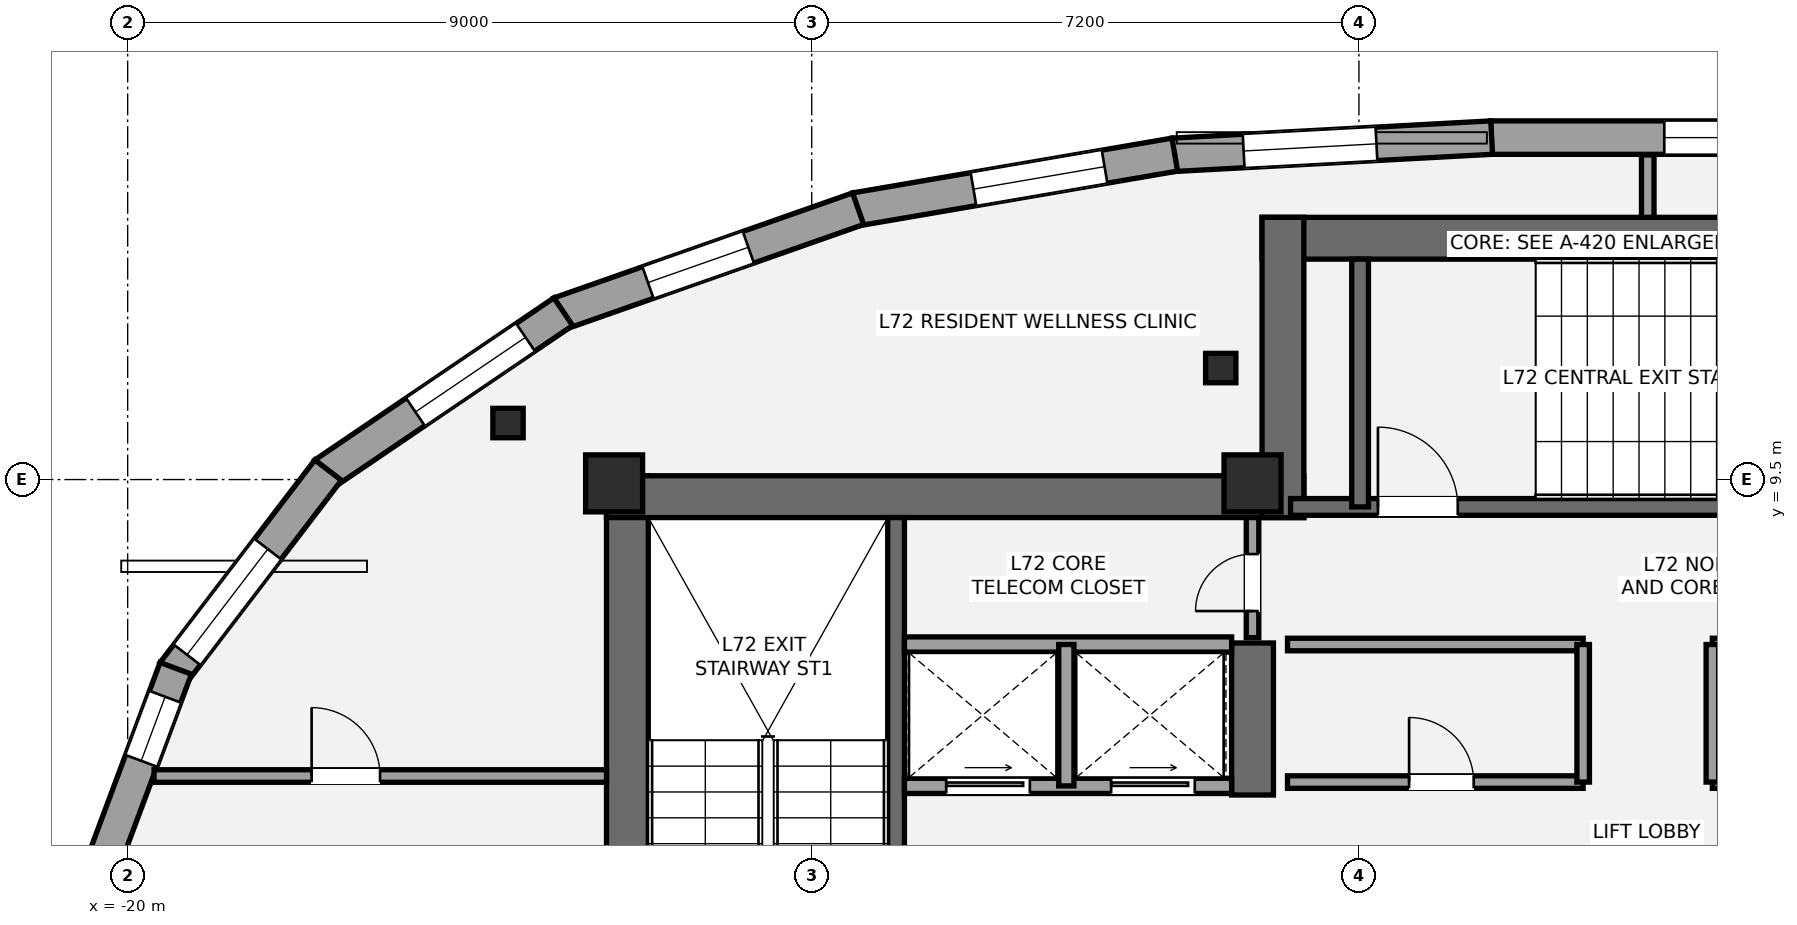
"""IFC4 building model, lengths in metres.
Left out: names, types, materials, properties, quantities, classifications, styles, units other than length and angle.
Written with IfcOpenShell. Run it as: python <this file> out.ifc"""

import sys

from ifc_helpers import new_model, si_unit, direction, frame, frame_2d, origin, origin_2d, place, context, subcontext, project, spatial, rectangle, i_section, extrude, element, fill, save


model = new_model("IFC4")
c1 = context("Model", 3, precision=1e-05, world=origin(), true_north=direction((0.0, 1.0)))
c2 = subcontext(c1, "Body", "Model", "MODEL_VIEW")
j1 = project(units=[si_unit("LENGTHUNIT", "METRE"), si_unit("PLANEANGLEUNIT", "RADIAN")], contexts=[c1])
p1 = place(None, origin())
s1 = spatial("IfcSite", under=j1, at=p1, CompositionType="ELEMENT")
p2 = place(p1, origin())
s2 = spatial("IfcBuilding", under=s1, at=p2, CompositionType="ELEMENT")
p3 = place(p2, frame((0.0, 0.0, 254.1)))
s3 = spatial("IfcBuildingStorey", under=s2, at=p3, CompositionType="ELEMENT", Elevation=254.1)
p4 = place(p3, frame((-13.425, 1.3, 0.0), z_axis=(0.0, 0.0, 1.0), x_axis=(0.0, 1.0, 0.0)))
e1 = element("IfcWall", 1, at=p4, inside=s3, PredefinedType="SHEAR", context=c2, shape_type="SweptSolid", body=[
    extrude(rectangle(XDim=8.25, YDim=0.55, at=frame_2d((4.125, 0.0))), origin(), (0.0, 0.0, 1.0), 3.15),
])
p5 = place(p3, frame((-13.7, 9.275, 0.0), z_axis=(0.0, 0.0, 1.0), x_axis=(1.0, 0.0, 0.0)))
e2 = element("IfcWall", 2, at=p5, inside=s3, PredefinedType="SHEAR", context=c2, shape_type="SweptSolid", body=[
    extrude(rectangle(XDim=9.175, YDim=0.55, at=frame_2d((4.587, 0.0))), origin(), (0.0, 0.0, 1.0), 3.15),
])
p6 = place(p3, frame((-5.2, 5.35, 0.0), z_axis=(0.0, 0.0, 1.0), x_axis=(0.0, 1.0, 0.0)))
e3 = element("IfcWall", 3, at=p6, inside=s3, PredefinedType="SHEAR", context=c2, shape_type="SweptSolid", body=[
    extrude(rectangle(XDim=2.0, YDim=0.55, at=frame_2d((1.0, 0.0))), origin(), (0.0, 0.0, 1.0), 3.15),
])
p7 = place(p3, frame((-9.89, 1.85, 0.0), z_axis=(0.0, 0.0, 1.0), x_axis=(0.0, 1.0, 0.0)))
e4 = element("IfcWall", 4, at=p7, inside=s3, PredefinedType="SHEAR", context=c2, shape_type="SweptSolid", body=[
    extrude(rectangle(XDim=7.15, YDim=0.22, at=frame_2d((3.575, 0.0))), origin(), (0.0, 0.0, 1.0), 3.15),
])
p8 = place(p3, frame((-5.075, 12.675, 0.0), z_axis=(0.0, 0.0, 1.0), x_axis=(1.0, 0.0, 0.0)))
e5 = element("IfcWall", 5, at=p8, inside=s3, PredefinedType="SHEAR", context=c2, shape_type="SweptSolid", body=[
    extrude(rectangle(XDim=10.15, YDim=0.55, at=frame_2d((5.075, 0.0))), origin(), (0.0, 0.0, 1.0), 3.15),
])
p9 = place(p3, frame((-4.8, 9.0, 0.0), z_axis=(0.0, 0.0, 1.0), x_axis=(0.0, 1.0, 0.0)))
e6 = element("IfcWall", 6, at=p9, inside=s3, PredefinedType="SHEAR", context=c2, shape_type="SweptSolid", body=[
    extrude(rectangle(XDim=3.95, YDim=0.55, at=frame_2d((1.975, 0.0))), origin(), (0.0, 0.0, 1.0), 3.15),
])
p10 = place(p3, frame((-4.7, 9.14, 0.0), z_axis=(0.0, 0.0, 1.0), x_axis=(1.0, 0.0, 0.0)))
e7 = element("IfcWall", 7, at=p10, inside=s3, PredefinedType="SHEAR", context=c2, shape_type="SweptSolid", body=[
    extrude(rectangle(XDim=9.3, YDim=0.22, at=frame_2d((4.65, 0.0))), origin(), (0.0, 0.0, 1.0), 3.15),
])
p11 = place(p10, frame((1.15, 0.0, 0.0)))
e8 = element("IfcOpeningElement", 8, at=p11, cuts=e7, PredefinedType="OPENING", context=c2, shape_type="SweptSolid", body=[
    extrude(rectangle(XDim=1.05, YDim=2.15, at=frame_2d((0.525, 1.075))), frame((0.0, 0.12, 0.0), z_axis=(0.0, -1.0, 0.0), x_axis=(1.0, 0.0, 0.0)), (0.0, 0.0, 1.0), 0.24),
])
p12 = place(p3, frame((-3.785, 9.14, 0.0), z_axis=(0.0, 0.0, 1.0), x_axis=(0.0, 1.0, 0.0)))
e9 = element("IfcWall", 9, at=p12, inside=s3, PredefinedType="SHEAR", context=c2, shape_type="SweptSolid", body=[
    extrude(rectangle(XDim=3.26, YDim=0.22, at=frame_2d((1.63, 0.0))), origin(), (0.0, 0.0, 1.0), 3.15),
])
for number, where, z_axis, x_axis in (
    (10, (-13.6, 9.45, 0.0), (0.0, 0.0, 1.0), (1.0, 0.0, 0.0)),
    (11, (-5.2, 9.45, 0.0), (0.0, 0.0, 1.0), (1.0, 0.0, 0.0)),
):
    element("IfcColumn", number, at=place(p3, frame(where, z_axis=z_axis, x_axis=x_axis)), inside=s3, PredefinedType="PILASTER", context=c2, shape_type="SweptSolid", body=[
        extrude(rectangle(XDim=0.75, YDim=0.75, at=origin_2d()), origin(), (0.0, 0.0, 1.0), 3.15),
    ])
for number, where, z_axis, x_axis in (
    (12, (-5.619, 10.967, 0.0), (0.0, 0.0, 1.0), (1.0, 0.0, 0.0)),
    (13, (-14.996, 10.244, 0.0), (0.0, 0.0, 1.0), (1.0, 0.0, 0.0)),
):
    element("IfcColumn", number, at=place(p3, frame(where, z_axis=z_axis, x_axis=x_axis)), inside=s3, PredefinedType="COLUMN", context=c2, shape_type="SweptSolid", body=[
        extrude(i_section(OverallWidth=0.399, OverallDepth=0.387, WebThickness=0.021, FlangeThickness=0.033, at=origin_2d()), origin(), (0.0, 0.0, 1.0), 3.15),
    ])
p13 = place(p3, frame((-2.065, 13.999, 0.0), z_axis=(0.0, 0.0, 1.0), x_axis=(1.0, 0.0, 0.0)))
e14 = element("IfcWall", 14, at=p13, inside=s3, PredefinedType="STANDARD", context=c2, shape_type="SweptSolid", body=[
    extrude(rectangle(XDim=4.131, YDim=0.44, at=frame_2d((2.065, 0.0))), origin(), (0.0, 0.0, 1.0), 2.336),
])
p14 = place(p13, frame((2.283, 0.0, 0.58)))
e15 = element("IfcOpeningElement", 15, at=p14, cuts=e14, PredefinedType="OPENING", context=c2, shape_type="SweptSolid", body=[
    extrude(rectangle(XDim=1.4, YDim=1.55, at=frame_2d((0.7, 0.775))), frame((0.0, 0.23, 0.0), z_axis=(0.0, -1.0, 0.0), x_axis=(1.0, 0.0, 0.0)), (0.0, 0.0, 1.0), 0.46),
])
p15 = place(p3, frame((-6.248, 13.772, 0.0), z_axis=(0.0, 0.0, 1.0), x_axis=(0.998541341871, 0.05399248627, 0.0)))
e16 = element("IfcWall", 16, at=p15, inside=s3, PredefinedType="STANDARD", context=c2, shape_type="SweptSolid", body=[
    extrude(rectangle(XDim=4.201, YDim=0.44, at=frame_2d((2.1, 0.0))), origin(), (0.0, 0.0, 1.0), 2.336),
])
p16 = place(p15, frame((0.932, 0.0, 0.55)))
e17 = element("IfcOpeningElement", 17, at=p16, cuts=e16, PredefinedType="OPENING", context=c2, shape_type="SweptSolid", body=[
    extrude(rectangle(XDim=1.75, YDim=1.55, at=frame_2d((0.875, 0.775))), frame((0.0, 0.23, 0.0), z_axis=(0.0, -1.0, 0.0), x_axis=(1.0, 0.0, 0.0)), (0.0, 0.0, 1.0), 0.46),
])
p17 = place(p3, frame((-10.425, 13.054, 0.0), z_axis=(0.0, 0.0, 1.0), x_axis=(0.985601268854, 0.169086187587, 0.0)))
e18 = element("IfcWall", 18, at=p17, inside=s3, PredefinedType="STANDARD", context=c2, shape_type="SweptSolid", body=[
    extrude(rectangle(XDim=4.264, YDim=0.44, at=frame_2d((2.132, 0.0))), origin(), (0.0, 0.0, 1.0), 2.336),
])
p18 = place(p17, frame((1.576, 0.0, 0.55)))
e19 = element("IfcOpeningElement", 19, at=p18, cuts=e18, PredefinedType="OPENING", context=c2, shape_type="SweptSolid", body=[
    extrude(rectangle(XDim=1.75, YDim=1.55, at=frame_2d((0.875, 0.775))), frame((0.0, 0.23, 0.0), z_axis=(0.0, -1.0, 0.0), x_axis=(1.0, 0.0, 0.0)), (0.0, 0.0, 1.0), 0.46),
])
p19 = place(p3, frame((-14.32, 11.683, 0.0), z_axis=(0.0, 0.0, 1.0), x_axis=(0.943461130408, 0.331483175152, 0.0)))
e20 = element("IfcWall", 20, at=p19, inside=s3, PredefinedType="STANDARD", context=c2, shape_type="SweptSolid", body=[
    extrude(rectangle(XDim=4.166, YDim=0.44, at=frame_2d((2.083, 0.0))), origin(), (0.0, 0.0, 1.0), 2.336),
])
p20 = place(p19, frame((1.235, 0.0, 0.55)))
e21 = element("IfcOpeningElement", 21, at=p20, cuts=e20, PredefinedType="OPENING", context=c2, shape_type="SweptSolid", body=[
    extrude(rectangle(XDim=1.4, YDim=1.55, at=frame_2d((0.7, 0.775))), frame((0.0, 0.23, 0.0), z_axis=(0.0, -1.0, 0.0), x_axis=(1.0, 0.0, 0.0)), (0.0, 0.0, 1.0), 0.46),
])
p21 = place(p3, frame((-17.414, 9.576, 0.0), z_axis=(0.0, 0.0, 1.0), x_axis=(0.827695346596, 0.561177702001, 0.0)))
e22 = element("IfcWall", 22, at=p21, inside=s3, PredefinedType="STANDARD", context=c2, shape_type="SweptSolid", body=[
    extrude(rectangle(XDim=3.8, YDim=0.44, at=frame_2d((1.9, 0.0))), origin(), (0.0, 0.0, 1.0), 2.336),
])
p22 = place(p21, frame((1.45, 0.0, 0.55)))
e23 = element("IfcOpeningElement", 23, at=p22, cuts=e22, PredefinedType="OPENING", context=c2, shape_type="SweptSolid", body=[
    extrude(rectangle(XDim=1.75, YDim=1.55, at=frame_2d((0.875, 0.775))), frame((0.0, 0.23, 0.0), z_axis=(0.0, -1.0, 0.0), x_axis=(1.0, 0.0, 0.0)), (0.0, 0.0, 1.0), 0.46),
])
p23 = place(p3, frame((-19.399, 6.96, 0.0), z_axis=(0.0, 0.0, 1.0), x_axis=(0.607266352304, 0.794498318034, 0.0)))
e24 = element("IfcWall", 24, at=p23, inside=s3, PredefinedType="STANDARD", context=c2, shape_type="SweptSolid", body=[
    extrude(rectangle(XDim=3.354, YDim=0.44, at=frame_2d((1.677, 0.0))), origin(), (0.0, 0.0, 1.0), 2.336),
])
p24 = place(p23, frame((0.296, 0.0, 0.55)))
e25 = element("IfcOpeningElement", 25, at=p24, cuts=e24, PredefinedType="OPENING", context=c2, shape_type="SweptSolid", body=[
    extrude(rectangle(XDim=1.75, YDim=1.55, at=frame_2d((0.875, 0.775))), frame((0.0, 0.23, 0.0), z_axis=(0.0, -1.0, 0.0), x_axis=(1.0, 0.0, 0.0)), (0.0, 0.0, 1.0), 0.46),
])
p25 = place(p3, frame((-20.431, 4.167, 0.0), z_axis=(0.0, 0.0, 1.0), x_axis=(0.349627332297, 0.936888856007, 0.0)))
e26 = element("IfcWall", 26, at=p25, inside=s3, PredefinedType="STANDARD", context=c2, shape_type="SweptSolid", body=[
    extrude(rectangle(XDim=3.041, YDim=0.44, at=frame_2d((1.521, 0.0))), origin(), (0.0, 0.0, 1.0), 2.336),
])
p26 = place(p25, frame((1.742, 0.0, 0.58)))
e27 = element("IfcOpeningElement", 27, at=p26, cuts=e26, PredefinedType="OPENING", context=c2, shape_type="SweptSolid", body=[
    extrude(rectangle(XDim=0.9, YDim=1.35, at=frame_2d((0.45, 0.675))), frame((0.0, 0.23, 0.0), z_axis=(0.0, -1.0, 0.0), x_axis=(1.0, 0.0, 0.0)), (0.0, 0.0, 1.0), 0.46),
])
p27 = place(p3, frame((-9.78, 5.47, 0.0), z_axis=(0.0, 0.0, 1.0), x_axis=(1.0, 0.0, 0.0)))
e28 = element("IfcWall", 28, at=p27, inside=s3, PredefinedType="SOLIDWALL", context=c2, shape_type="SweptSolid", body=[
    extrude(rectangle(XDim=4.305, YDim=0.2, at=frame_2d((2.152, 0.0))), origin(), (0.0, 0.0, 1.0), 2.97),
])
p28 = place(p27, frame((0.55, 0.0, 0.0)))
e29 = element("IfcOpeningElement", 29, at=p28, cuts=e28, PredefinedType="OPENING", context=c2, shape_type="SweptSolid", body=[
    extrude(rectangle(XDim=1.1, YDim=2.2, at=frame_2d((0.55, 1.1))), frame((0.0, 0.11, 0.0), z_axis=(0.0, -1.0, 0.0), x_axis=(1.0, 0.0, 0.0)), (0.0, 0.0, 1.0), 0.22),
])
p29 = place(p27, frame((2.72, 0.0, 0.0)))
e30 = element("IfcOpeningElement", 30, at=p29, cuts=e28, PredefinedType="OPENING", context=c2, shape_type="SweptSolid", body=[
    extrude(rectangle(XDim=1.1, YDim=2.2, at=frame_2d((0.55, 1.1))), frame((0.0, 0.11, 0.0), z_axis=(0.0, -1.0, 0.0), x_axis=(1.0, 0.0, 0.0)), (0.0, 0.0, 1.0), 0.22),
])
p30 = place(p3, frame((-9.78, 7.33, 0.0), z_axis=(0.0, 0.0, 1.0), x_axis=(1.0, 0.0, 0.0)))
e31 = element("IfcWall", 31, at=p30, inside=s3, PredefinedType="SOLIDWALL", context=c2, shape_type="SweptSolid", body=[
    extrude(rectangle(XDim=4.305, YDim=0.2, at=frame_2d((2.152, 0.0))), origin(), (0.0, 0.0, 1.0), 2.97),
])
p31 = place(p3, frame((-7.65, 5.47, 0.0), z_axis=(0.0, 0.0, 1.0), x_axis=(0.0, 1.0, 0.0)))
e32 = element("IfcWall", 32, at=p31, inside=s3, PredefinedType="SOLIDWALL", context=c2, shape_type="SweptSolid", body=[
    extrude(rectangle(XDim=1.86, YDim=0.2, at=frame_2d((0.93, 0.0))), origin(), (0.0, 0.0, 1.0), 2.97),
])
p32 = place(p3, frame((-4.74, 5.52, 0.0), z_axis=(0.0, 0.0, 1.0), x_axis=(1.0, 0.0, 0.0)))
e33 = element("IfcWall", 33, at=p32, inside=s3, PredefinedType="PARTITIONING", context=c2, shape_type="SweptSolid", body=[
    extrude(rectangle(XDim=3.89, YDim=0.165, at=frame_2d((1.945, 0.0))), origin(), (0.0, 0.0, 1.0), 2.97),
])
p33 = place(p32, frame((1.6, 0.0, 0.0)))
e34 = element("IfcOpeningElement", 34, at=p33, cuts=e33, PredefinedType="OPENING", context=c2, shape_type="SweptSolid", body=[
    extrude(rectangle(XDim=0.85, YDim=2.1, at=frame_2d((0.425, 1.05))), frame((0.0, 0.093, 0.0), z_axis=(0.0, -1.0, 0.0), x_axis=(1.0, 0.0, 0.0)), (0.0, 0.0, 1.0), 0.185),
])
p34 = place(p3, frame((-4.74, 7.33, 0.0), z_axis=(0.0, 0.0, 1.0), x_axis=(1.0, 0.0, 0.0)))
e35 = element("IfcWall", 35, at=p34, inside=s3, PredefinedType="PARTITIONING", context=c2, shape_type="SweptSolid", body=[
    extrude(rectangle(XDim=3.89, YDim=0.165, at=frame_2d((1.945, 0.0))), origin(), (0.0, 0.0, 1.0), 2.97),
])
p35 = place(p3, frame((-0.85, 5.52, 0.0), z_axis=(0.0, 0.0, 1.0), x_axis=(0.0, 1.0, 0.0)))
e36 = element("IfcWall", 36, at=p35, inside=s3, PredefinedType="PARTITIONING", context=c2, shape_type="SweptSolid", body=[
    extrude(rectangle(XDim=1.81, YDim=0.165, at=frame_2d((0.905, 0.0))), origin(), (0.0, 0.0, 1.0), 2.97),
])
p36 = place(p3, frame((0.85, 5.52, 0.0), z_axis=(0.0, 0.0, 1.0), x_axis=(1.0, 0.0, 0.0)))
e37 = element("IfcWall", 37, at=p36, inside=s3, PredefinedType="PARTITIONING", context=c2, shape_type="SweptSolid", body=[
    extrude(rectangle(XDim=3.89, YDim=0.165, at=frame_2d((1.945, 0.0))), origin(), (0.0, 0.0, 1.0), 2.97),
])
p37 = place(p36, frame((1.6, 0.0, 0.0)))
e38 = element("IfcOpeningElement", 38, at=p37, cuts=e37, PredefinedType="OPENING", context=c2, shape_type="SweptSolid", body=[
    extrude(rectangle(XDim=0.85, YDim=2.1, at=frame_2d((0.425, 1.05))), frame((0.0, 0.093, 0.0), z_axis=(0.0, -1.0, 0.0), x_axis=(1.0, 0.0, 0.0)), (0.0, 0.0, 1.0), 0.185),
])
p38 = place(p3, frame((0.85, 7.33, 0.0), z_axis=(0.0, 0.0, 1.0), x_axis=(1.0, 0.0, 0.0)))
e39 = element("IfcWall", 39, at=p38, inside=s3, PredefinedType="PARTITIONING", context=c2, shape_type="SweptSolid", body=[
    extrude(rectangle(XDim=3.89, YDim=0.165, at=frame_2d((1.945, 0.0))), origin(), (0.0, 0.0, 1.0), 2.97),
])
p39 = place(p3, frame((0.85, 5.52, 0.0), z_axis=(0.0, 0.0, 1.0), x_axis=(0.0, 1.0, 0.0)))
e40 = element("IfcWall", 40, at=p39, inside=s3, PredefinedType="PARTITIONING", context=c2, shape_type="SweptSolid", body=[
    extrude(rectangle(XDim=1.81, YDim=0.165, at=frame_2d((0.905, 0.0))), origin(), (0.0, 0.0, 1.0), 2.97),
])
p40 = place(p3, frame((-5.2, 7.42, 0.0), z_axis=(0.0, 0.0, 1.0), x_axis=(0.0, 1.0, 0.0)))
e41 = element("IfcWall", 41, at=p40, inside=s3, PredefinedType="PARTITIONING", context=c2, shape_type="SweptSolid", body=[
    extrude(rectangle(XDim=1.58, YDim=0.165, at=frame_2d((0.79, 0.0))), origin(), (0.0, 0.0, 1.0), 2.97),
])
p41 = place(p40, frame((0.35, 0.0, 0.0)))
e42 = element("IfcOpeningElement", 42, at=p41, cuts=e41, PredefinedType="OPENING", context=c2, shape_type="SweptSolid", body=[
    extrude(rectangle(XDim=0.75, YDim=2.1, at=frame_2d((0.375, 1.05))), frame((0.0, 0.093, 0.0), z_axis=(0.0, -1.0, 0.0), x_axis=(1.0, 0.0, 0.0)), (0.0, 0.0, 1.0), 0.185),
])
p42 = place(p3, frame((0.0, 12.95, 0.0), z_axis=(0.0, 0.0, 1.0), x_axis=(0.0, 1.0, 0.0)))
e43 = element("IfcWall", 43, at=p42, inside=s3, PredefinedType="PARTITIONING", context=c2, shape_type="SweptSolid", body=[
    extrude(rectangle(XDim=0.821, YDim=0.165, at=frame_2d((0.41, 0.0))), origin(), (0.0, 0.0, 1.0), 2.97),
])
p43 = place(p3, frame((-19.653, 5.6, 0.0), z_axis=(0.0, 0.0, 1.0), x_axis=(1.0, 0.0, 0.0)))
e44 = element("IfcWall", 44, at=p43, inside=s3, PredefinedType="PARTITIONING", context=c2, shape_type="SweptSolid", body=[
    extrude(rectangle(XDim=5.953, YDim=0.165, at=frame_2d((2.977, 0.0))), origin(), (0.0, 0.0, 1.0), 2.97),
])
p44 = place(p43, frame((2.073, 0.0, 0.0)))
e45 = element("IfcOpeningElement", 45, at=p44, cuts=e44, PredefinedType="OPENING", context=c2, shape_type="SweptSolid", body=[
    extrude(rectangle(XDim=0.9, YDim=2.1, at=frame_2d((0.45, 1.05))), frame((0.0, 0.093, 0.0), z_axis=(0.0, -1.0, 0.0), x_axis=(1.0, 0.0, 0.0)), (0.0, 0.0, 1.0), 0.185),
])
p45 = place(p14, origin())
e46 = element("IfcWindow", 46, at=p45, inside=s3, PartitioningType="SINGLE_PANEL", PredefinedType="WINDOW", context=c2, shape_type="SweptSolid", body=[
    extrude(rectangle(XDim=1.4, YDim=1.55, at=frame_2d((0.7, 0.775))), frame((0.0, -0.01, 0.0), z_axis=(0.0, -1.0, 0.0), x_axis=(1.0, 0.0, 0.0)), (0.0, 0.0, 1.0), 0.06),
])
fill(e15, e46)
p46 = place(p16, origin())
e47 = element("IfcWindow", 47, at=p46, inside=s3, PartitioningType="SINGLE_PANEL", PredefinedType="WINDOW", context=c2, shape_type="SweptSolid", body=[
    extrude(rectangle(XDim=1.75, YDim=1.55, at=frame_2d((0.875, 0.775))), frame((0.0, -0.01, 0.0), z_axis=(0.0, -1.0, 0.0), x_axis=(1.0, 0.0, 0.0)), (0.0, 0.0, 1.0), 0.06),
])
fill(e17, e47)
p47 = place(p18, origin())
e48 = element("IfcWindow", 48, at=p47, inside=s3, PartitioningType="SINGLE_PANEL", PredefinedType="WINDOW", context=c2, shape_type="SweptSolid", body=[
    extrude(rectangle(XDim=1.75, YDim=1.55, at=frame_2d((0.875, 0.775))), frame((0.0, -0.01, 0.0), z_axis=(0.0, -1.0, 0.0), x_axis=(1.0, 0.0, 0.0)), (0.0, 0.0, 1.0), 0.06),
])
fill(e19, e48)
p48 = place(p20, origin())
e49 = element("IfcWindow", 49, at=p48, inside=s3, PartitioningType="SINGLE_PANEL", PredefinedType="WINDOW", context=c2, shape_type="SweptSolid", body=[
    extrude(rectangle(XDim=1.4, YDim=1.55, at=frame_2d((0.7, 0.775))), frame((0.0, -0.01, 0.0), z_axis=(0.0, -1.0, 0.0), x_axis=(1.0, 0.0, 0.0)), (0.0, 0.0, 1.0), 0.06),
])
fill(e21, e49)
p49 = place(p22, origin())
e50 = element("IfcWindow", 50, at=p49, inside=s3, PartitioningType="SINGLE_PANEL", PredefinedType="WINDOW", context=c2, shape_type="SweptSolid", body=[
    extrude(rectangle(XDim=1.75, YDim=1.55, at=frame_2d((0.875, 0.775))), frame((0.0, -0.01, 0.0), z_axis=(0.0, -1.0, 0.0), x_axis=(1.0, 0.0, 0.0)), (0.0, 0.0, 1.0), 0.06),
])
fill(e23, e50)
p50 = place(p24, origin())
e51 = element("IfcWindow", 51, at=p50, inside=s3, PartitioningType="SINGLE_PANEL", PredefinedType="WINDOW", context=c2, shape_type="SweptSolid", body=[
    extrude(rectangle(XDim=1.75, YDim=1.55, at=frame_2d((0.875, 0.775))), frame((0.0, -0.01, 0.0), z_axis=(0.0, -1.0, 0.0), x_axis=(1.0, 0.0, 0.0)), (0.0, 0.0, 1.0), 0.06),
])
fill(e25, e51)
p51 = place(p26, origin())
e52 = element("IfcWindow", 52, at=p51, inside=s3, PartitioningType="SINGLE_PANEL", PredefinedType="WINDOW", context=c2, shape_type="SweptSolid", body=[
    extrude(rectangle(XDim=0.9, YDim=1.35, at=frame_2d((0.45, 0.675))), frame((0.0, -0.01, 0.0), z_axis=(0.0, -1.0, 0.0), x_axis=(1.0, 0.0, 0.0)), (0.0, 0.0, 1.0), 0.06),
])
fill(e27, e52)
p52 = place(p11, origin())
e53 = element("IfcDoor", 53, at=p52, inside=s3, OperationType="SINGLE_SWING_LEFT", PredefinedType="DOOR", context=c2, shape_type="SweptSolid", body=[
    extrude(rectangle(XDim=1.05, YDim=2.15, at=frame_2d((0.525, 1.075))), frame((0.0, 0.025, 0.0), z_axis=(0.0, -1.0, 0.0), x_axis=(1.0, 0.0, 0.0)), (0.0, 0.0, 1.0), 0.05),
])
fill(e8, e53)
p53 = place(p28, origin())
e54 = element("IfcDoor", 54, at=p53, inside=s3, OperationType="SLIDING_TO_LEFT", PredefinedType="DOOR", context=c2, shape_type="SweptSolid", body=[
    extrude(rectangle(XDim=1.1, YDim=2.2, at=frame_2d((0.55, 1.1))), frame((0.0, 0.025, 0.0), z_axis=(0.0, -1.0, 0.0), x_axis=(1.0, 0.0, 0.0)), (0.0, 0.0, 1.0), 0.05),
])
fill(e29, e54)
p54 = place(p29, origin())
e55 = element("IfcDoor", 55, at=p54, inside=s3, OperationType="SLIDING_TO_LEFT", PredefinedType="DOOR", context=c2, shape_type="SweptSolid", body=[
    extrude(rectangle(XDim=1.1, YDim=2.2, at=frame_2d((0.55, 1.1))), frame((0.0, 0.025, 0.0), z_axis=(0.0, -1.0, 0.0), x_axis=(1.0, 0.0, 0.0)), (0.0, 0.0, 1.0), 0.05),
])
fill(e30, e55)
p55 = place(p33, origin())
e56 = element("IfcDoor", 56, at=p55, inside=s3, OperationType="SINGLE_SWING_LEFT", PredefinedType="DOOR", context=c2, shape_type="SweptSolid", body=[
    extrude(rectangle(XDim=0.85, YDim=2.1, at=frame_2d((0.425, 1.05))), frame((0.0, 0.025, 0.0), z_axis=(0.0, -1.0, 0.0), x_axis=(1.0, 0.0, 0.0)), (0.0, 0.0, 1.0), 0.05),
])
fill(e34, e56)
p56 = place(p41, origin())
e57 = element("IfcDoor", 57, at=p56, inside=s3, OperationType="SINGLE_SWING_LEFT", PredefinedType="DOOR", context=c2, shape_type="SweptSolid", body=[
    extrude(rectangle(XDim=0.75, YDim=2.1, at=frame_2d((0.375, 1.05))), frame((0.0, 0.025, 0.0), z_axis=(0.0, -1.0, 0.0), x_axis=(1.0, 0.0, 0.0)), (0.0, 0.0, 1.0), 0.05),
])
fill(e42, e57)
p57 = place(p44, origin())
e58 = element("IfcDoor", 58, at=p57, inside=s3, OperationType="SINGLE_SWING_LEFT", PredefinedType="DOOR", context=c2, shape_type="SweptSolid", body=[
    extrude(rectangle(XDim=0.9, YDim=2.1, at=frame_2d((0.45, 1.05))), frame((0.0, 0.025, 0.0), z_axis=(0.0, -1.0, 0.0), x_axis=(1.0, 0.0, 0.0)), (0.0, 0.0, 1.0), 0.05),
])
fill(e45, e58)
save(model, sys.argv[1])
